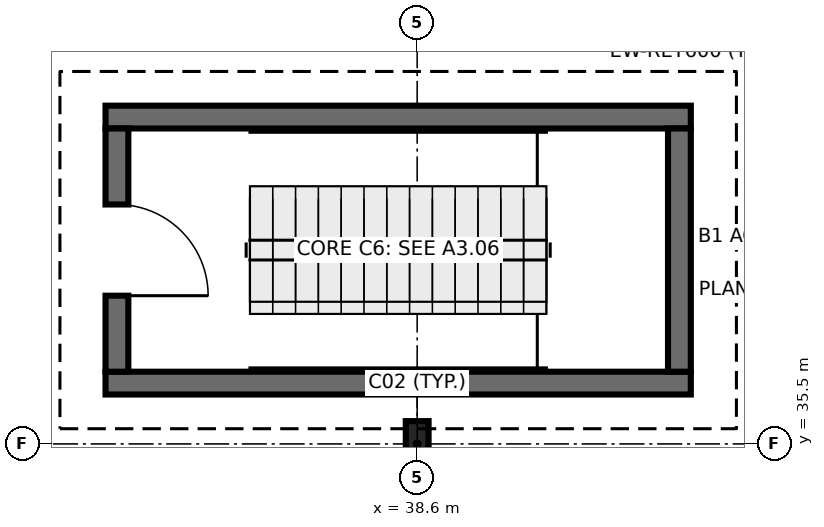
"""IFC4 building model, lengths in metres.
Left out: names, types, materials, properties, quantities, classifications, styles, units other than length and angle.
Written with IfcOpenShell. Run it as: python <this file> out.ifc"""

import sys

from ifc_helpers import new_model, si_unit, direction, frame, frame_2d, origin, origin_2d, place, context, subcontext, project, spatial, rectangle, i_section, extrude, element, fill, save


model = new_model("IFC4")
c1 = context("Model", 3, precision=1e-05, world=origin(), true_north=direction((0.0, 1.0)))
c2 = subcontext(c1, "Body", "Model", "MODEL_VIEW")
j1 = project(units=[si_unit("LENGTHUNIT", "METRE"), si_unit("PLANEANGLEUNIT", "RADIAN")], contexts=[c1])
p1 = place(None, origin())
s1 = spatial("IfcSite", under=j1, at=p1, CompositionType="ELEMENT")
p2 = place(p1, origin())
s2 = spatial("IfcBuilding", under=s1, at=p2, CompositionType="ELEMENT")
p3 = place(p2, frame((0.0, 0.0, -5.0)))
s3 = spatial("IfcBuildingStorey", under=s2, at=p3, CompositionType="ELEMENT", Elevation=-5.0)
p4 = place(p3, frame((38.6, 35.5, 0.0), z_axis=(0.0, 0.0, 1.0), x_axis=(1.0, 0.0, 0.0)))
e1 = element("IfcColumn", 1, at=p4, inside=s3, PredefinedType="COLUMN", context=c2, shape_type="SweptSolid", body=[
    extrude(i_section(OverallWidth=0.3, OverallDepth=0.6, WebThickness=0.015, FlangeThickness=0.03, FilletRadius=0.027, at=origin_2d()), origin(), (0.0, 0.0, 1.0), 5.0),
])
for number, where, z_axis, x_axis in (
    (2, (34.5, 36.3, 0.0), (0.0, 0.0, 1.0), (1.0, 0.0, 0.0)),
    (3, (42.2, 39.8, 0.0), (0.0, 0.0, 1.0), (-1.0, 0.0, 0.0)),
):
    element("IfcWall", number, at=place(p3, frame(where, z_axis=z_axis, x_axis=x_axis)), inside=s3, PredefinedType="SHEAR", context=c2, shape_type="SweptSolid", body=[
        extrude(rectangle(XDim=7.7, YDim=0.3, at=frame_2d((3.85, 0.0))), origin(), (0.0, 0.0, 1.0), 5.0),
    ])
p5 = place(p3, frame((34.65, 39.65, 0.0), z_axis=(0.0, 0.0, 1.0), x_axis=(0.0, -1.0, 0.0)))
e4 = element("IfcWall", 4, at=p5, inside=s3, PredefinedType="SHEAR", context=c2, shape_type="SweptSolid", body=[
    extrude(rectangle(XDim=3.2, YDim=0.3, at=frame_2d((1.6, 0.0))), origin(), (0.0, 0.0, 1.0), 5.0),
])
p6 = place(p5, frame((1.0, 0.0, 0.0)))
e5 = element("IfcOpeningElement", 5, at=p6, cuts=e4, PredefinedType="OPENING", context=c2, shape_type="SweptSolid", body=[
    extrude(rectangle(XDim=1.2, YDim=2.15, at=frame_2d((0.6, 1.075))), frame((0.0, 0.16, 0.0), z_axis=(0.0, -1.0, 0.0), x_axis=(1.0, 0.0, 0.0)), (0.0, 0.0, 1.0), 0.32),
])
p7 = place(p3, frame((42.05, 36.45, 0.0), z_axis=(0.0, 0.0, 1.0), x_axis=(0.0, 1.0, 0.0)))
e6 = element("IfcWall", 6, at=p7, inside=s3, PredefinedType="SHEAR", context=c2, shape_type="SweptSolid", body=[
    extrude(rectangle(XDim=3.2, YDim=0.3, at=frame_2d((1.6, 0.0))), origin(), (0.0, 0.0, 1.0), 5.0),
])
p8 = place(p6, origin())
e7 = element("IfcDoor", 7, at=p8, inside=s3, OperationType="SINGLE_SWING_RIGHT", PredefinedType="DOOR", context=c2, shape_type="SweptSolid", body=[
    extrude(rectangle(XDim=1.2, YDim=2.15, at=frame_2d((0.6, 1.075))), frame((0.0, 0.025, 0.0), z_axis=(0.0, -1.0, 0.0), x_axis=(1.0, 0.0, 0.0)), (0.0, 0.0, 1.0), 0.05),
])
fill(e5, e7)
save(model, sys.argv[1])
